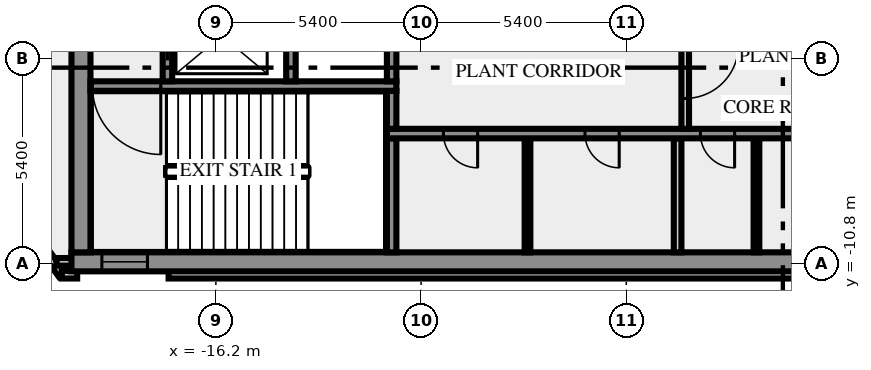
"""IFC4 building model, lengths in metres.
Left out: names, types, materials, properties, quantities, classifications, styles, units other than length and angle.
Written with IfcOpenShell. Run it as: python <this file> out.ifc"""

import sys

from ifc_helpers import new_model, si_unit, direction, frame, frame_2d, origin, place, context, subcontext, project, spatial, rectangle, extrude, element, fill, save


model = new_model("IFC4")
c1 = context("Model", 3, precision=1e-05, world=origin(), true_north=direction((0.0, 1.0)))
c2 = subcontext(c1, "Body", "Model", "MODEL_VIEW")
j1 = project(units=[si_unit("LENGTHUNIT", "METRE"), si_unit("PLANEANGLEUNIT", "RADIAN")], contexts=[c1])
p1 = place(None, origin())
s1 = spatial("IfcSite", under=j1, at=p1, CompositionType="ELEMENT")
p2 = place(p1, origin())
s2 = spatial("IfcBuilding", under=s1, at=p2, CompositionType="ELEMENT")
p3 = place(p2, frame((0.0, 0.0, 188.0)))
s3 = spatial("IfcBuildingStorey", under=s2, at=p3, CompositionType="ELEMENT", Elevation=188.0)
p4 = place(p3, frame((-21.833, -8.909, 0.0), z_axis=(0.0, 0.0, 1.0), x_axis=(0.587766567315, -0.809030569476, 0.0)))
e1 = element("IfcWall", 1, at=p4, inside=s3, PredefinedType="SOLIDWALL", context=c2, shape_type="SweptSolid", body=[
    extrude(rectangle(XDim=2.688, YDim=0.2, at=frame_2d((1.344, 0.0))), origin(), (0.0, 0.0, 1.0), 5.65),
])
p5 = place(p3, frame((-20.256, -11.088, 0.0), z_axis=(0.0, 0.0, 1.0), x_axis=(1.0, 0.0, 0.0)))
e2 = element("IfcWall", 2, at=p5, inside=s3, PredefinedType="SOLIDWALL", context=c2, shape_type="SweptSolid", body=[
    extrude(rectangle(XDim=0.406, YDim=0.2, at=frame_2d((0.203, 0.0))), origin(), (0.0, 0.0, 1.0), 5.65),
])
p6 = place(p3, frame((-17.444, -11.088, 0.0), z_axis=(0.0, 0.0, 1.0), x_axis=(1.0, 0.0, 0.0)))
e3 = element("IfcWall", 3, at=p6, inside=s3, PredefinedType="SOLIDWALL", context=c2, shape_type="SweptSolid", body=[
    extrude(rectangle(XDim=34.888, YDim=0.2, at=frame_2d((17.444, 0.0))), origin(), (0.0, 0.0, 1.0), 5.65),
])
p7 = place(p3, frame((-19.98, -10.75, 0.0), z_axis=(0.0, 0.0, 1.0), x_axis=(-1.0, 0.0, 0.0)))
e4 = element("IfcWall", 4, at=p7, inside=s3, PredefinedType="SOLIDWALL", context=c2, shape_type="SweptSolid", body=[
    extrude(rectangle(XDim=0.417, YDim=0.2, at=frame_2d((0.208, 0.0))), origin(), (0.0, 0.0, 1.0), 5.65),
])
p8 = place(p3, frame((-20.0, -10.75, 0.0), z_axis=(0.0, 0.0, 1.0), x_axis=(1.0, 0.0, 0.0)))
e5 = element("IfcWall", 5, at=p8, inside=s3, PredefinedType="SHEAR", context=c2, shape_type="SweptSolid", body=[
    extrude(rectangle(XDim=40.0, YDim=0.5, at=frame_2d((20.0, 0.0))), origin(), (0.0, 0.0, 1.0), 5.65),
])
p9 = place(p8, frame((0.8, 0.0, 1.0)))
e6 = element("IfcOpeningElement", 6, at=p9, cuts=e5, PredefinedType="OPENING", context=c2, shape_type="SweptSolid", body=[
    extrude(rectangle(XDim=1.2, YDim=1.2, at=frame_2d((0.6, 0.6))), frame((0.0, 0.26, 0.0), z_axis=(0.0, -1.0, 0.0), x_axis=(1.0, 0.0, 0.0)), (0.0, 0.0, 1.0), 0.52),
])
p10 = place(p8, frame((38.0, 0.0, 1.0)))
e7 = element("IfcOpeningElement", 7, at=p10, cuts=e5, PredefinedType="OPENING", context=c2, shape_type="SweptSolid", body=[
    extrude(rectangle(XDim=1.2, YDim=1.2, at=frame_2d((0.6, 0.6))), frame((0.0, 0.26, 0.0), z_axis=(0.0, -1.0, 0.0), x_axis=(1.0, 0.0, 0.0)), (0.0, 0.0, 1.0), 0.52),
])
p11 = place(p3, frame((-19.75, -10.5, 0.0), z_axis=(0.0, 0.0, 1.0), x_axis=(0.0, 1.0, 0.0)))
e8 = element("IfcWall", 8, at=p11, inside=s3, PredefinedType="SHEAR", context=c2, shape_type="SweptSolid", body=[
    extrude(rectangle(XDim=8.8, YDim=0.5, at=frame_2d((4.4, 0.0))), origin(), (0.0, 0.0, 1.0), 5.65),
])
p12 = place(p3, frame((-11.575, -10.5, 0.0), z_axis=(0.0, 0.0, 1.0), x_axis=(0.0, 1.0, 0.0)))
e9 = element("IfcWall", 9, at=p12, inside=s3, PredefinedType="SHEAR", context=c2, shape_type="SweptSolid", body=[
    extrude(rectangle(XDim=3.0, YDim=0.25, at=frame_2d((1.5, 0.0))), origin(), (0.0, 0.0, 1.0), 5.65),
])
p13 = place(p3, frame((-8.0, -10.5, 0.0), z_axis=(0.0, 0.0, 1.0), x_axis=(0.0, 1.0, 0.0)))
e10 = element("IfcWall", 10, at=p13, inside=s3, PredefinedType="PARTITIONING", context=c2, shape_type="SweptSolid", body=[
    extrude(rectangle(XDim=3.0, YDim=0.15, at=frame_2d((1.5, 0.0))), origin(), (0.0, 0.0, 1.0), 5.65),
])
p14 = place(p3, frame((-4.05, -10.5, 0.0), z_axis=(0.0, 0.0, 1.0), x_axis=(0.0, 1.0, 0.0)))
e11 = element("IfcWall", 11, at=p14, inside=s3, PredefinedType="SOLIDWALL", context=c2, shape_type="SweptSolid", body=[
    extrude(rectangle(XDim=3.0, YDim=0.2, at=frame_2d((1.5, 0.0))), origin(), (0.0, 0.0, 1.0), 5.65),
])
p15 = place(p3, frame((-1.975, -10.5, 0.0), z_axis=(0.0, 0.0, 1.0), x_axis=(0.0, 1.0, 0.0)))
e12 = element("IfcWall", 12, at=p15, inside=s3, PredefinedType="PARTITIONING", context=c2, shape_type="SweptSolid", body=[
    extrude(rectangle(XDim=3.0, YDim=0.15, at=frame_2d((1.5, 0.0))), origin(), (0.0, 0.0, 1.0), 5.65),
])
p16 = place(p3, frame((11.7, -7.375, 0.0), z_axis=(0.0, 0.0, 1.0), x_axis=(-1.0, 0.0, 0.0)))
e13 = element("IfcWall", 13, at=p16, inside=s3, PredefinedType="SHEAR", context=c2, shape_type="SweptSolid", body=[
    extrude(rectangle(XDim=23.4, YDim=0.25, at=frame_2d((11.7, 0.0))), origin(), (0.0, 0.0, 1.0), 5.65),
])
p17 = place(p16, frame((21.012, 0.0, 0.0)))
e14 = element("IfcOpeningElement", 14, at=p17, cuts=e13, PredefinedType="OPENING", context=c2, shape_type="SweptSolid", body=[
    extrude(rectangle(XDim=0.9, YDim=2.1, at=frame_2d((0.45, 1.05))), frame((0.0, 0.135, 0.0), z_axis=(0.0, -1.0, 0.0), x_axis=(1.0, 0.0, 0.0)), (0.0, 0.0, 1.0), 0.27),
])
p18 = place(p16, frame((17.287, 0.0, 0.0)))
e15 = element("IfcOpeningElement", 15, at=p18, cuts=e13, PredefinedType="OPENING", context=c2, shape_type="SweptSolid", body=[
    extrude(rectangle(XDim=0.9, YDim=2.1, at=frame_2d((0.45, 1.05))), frame((0.0, 0.135, 0.0), z_axis=(0.0, -1.0, 0.0), x_axis=(1.0, 0.0, 0.0)), (0.0, 0.0, 1.0), 0.27),
])
p19 = place(p16, frame((14.25, 0.0, 0.0)))
e16 = element("IfcOpeningElement", 16, at=p19, cuts=e13, PredefinedType="OPENING", context=c2, shape_type="SweptSolid", body=[
    extrude(rectangle(XDim=0.9, YDim=2.1, at=frame_2d((0.45, 1.05))), frame((0.0, 0.135, 0.0), z_axis=(0.0, -1.0, 0.0), x_axis=(1.0, 0.0, 0.0)), (0.0, 0.0, 1.0), 0.27),
])
p20 = place(p16, frame((11.475, 0.0, 0.0)))
e17 = element("IfcOpeningElement", 17, at=p20, cuts=e13, PredefinedType="OPENING", context=c2, shape_type="SweptSolid", body=[
    extrude(rectangle(XDim=0.9, YDim=2.1, at=frame_2d((0.45, 1.05))), frame((0.0, 0.135, 0.0), z_axis=(0.0, -1.0, 0.0), x_axis=(1.0, 0.0, 0.0)), (0.0, 0.0, 1.0), 0.27),
])
p21 = place(p3, frame((-11.575, -7.25, 0.0), z_axis=(0.0, 0.0, 1.0), x_axis=(0.0, 1.0, 0.0)))
e18 = element("IfcWall", 18, at=p21, inside=s3, PredefinedType="SHEAR", context=c2, shape_type="SweptSolid", body=[
    extrude(rectangle(XDim=1.0, YDim=0.25, at=frame_2d((0.5, 0.0))), origin(), (0.0, 0.0, 1.0), 5.65),
])
p22 = place(p3, frame((-3.85, -4.25, 0.0), z_axis=(0.0, 0.0, 1.0), x_axis=(0.0, -1.0, 0.0)))
e19 = element("IfcWall", 19, at=p22, inside=s3, PredefinedType="SOLIDWALL", context=c2, shape_type="SweptSolid", body=[
    extrude(rectangle(XDim=3.0, YDim=0.2, at=frame_2d((1.5, 0.0))), origin(), (0.0, 0.0, 1.0), 5.65),
])
p23 = place(p22, frame((0.8, 0.0, 0.0)))
e20 = element("IfcOpeningElement", 20, at=p23, cuts=e19, PredefinedType="OPENING", context=c2, shape_type="SweptSolid", body=[
    extrude(rectangle(XDim=1.4, YDim=2.1, at=frame_2d((0.7, 1.05))), frame((0.0, 0.11, 0.0), z_axis=(0.0, -1.0, 0.0), x_axis=(1.0, 0.0, 0.0)), (0.0, 0.0, 1.0), 0.22),
])
p24 = place(p3, frame((-11.45, -6.125, 0.0), z_axis=(0.0, 0.0, 1.0), x_axis=(-1.0, 0.0, 0.0)))
e21 = element("IfcWall", 21, at=p24, inside=s3, PredefinedType="SHEAR", context=c2, shape_type="SweptSolid", body=[
    extrude(rectangle(XDim=8.05, YDim=0.25, at=frame_2d((4.025, 0.0))), origin(), (0.0, 0.0, 1.0), 5.65),
])
p25 = place(p24, frame((6.2, 0.0, 0.0)))
e22 = element("IfcOpeningElement", 22, at=p25, cuts=e21, PredefinedType="OPENING", context=c2, shape_type="SweptSolid", body=[
    extrude(rectangle(XDim=1.8, YDim=2.1, at=frame_2d((0.9, 1.05))), frame((0.0, 0.135, 0.0), z_axis=(0.0, -1.0, 0.0), x_axis=(1.0, 0.0, 0.0)), (0.0, 0.0, 1.0), 0.27),
])
p26 = place(p3, frame((-17.475, -6.0, 0.0), z_axis=(0.0, 0.0, 1.0), x_axis=(0.0, 1.0, 0.0)))
e23 = element("IfcWall", 23, at=p26, inside=s3, PredefinedType="SHEAR", context=c2, shape_type="SweptSolid", body=[
    extrude(rectangle(XDim=4.3, YDim=0.25, at=frame_2d((2.15, 0.0))), origin(), (0.0, 0.0, 1.0), 5.65),
])
p27 = place(p26, frame((0.55, 0.0, 0.0)))
e24 = element("IfcOpeningElement", 24, at=p27, cuts=e23, PredefinedType="OPENING", context=c2, shape_type="SweptSolid", body=[
    extrude(rectangle(XDim=1.3, YDim=2.1, at=frame_2d((0.65, 1.05))), frame((0.0, 0.135, 0.0), z_axis=(0.0, -1.0, 0.0), x_axis=(1.0, 0.0, 0.0)), (0.0, 0.0, 1.0), 0.27),
])
p28 = place(p3, frame((-14.225, -6.0, 0.0), z_axis=(0.0, 0.0, 1.0), x_axis=(0.0, 1.0, 0.0)))
e25 = element("IfcWall", 25, at=p28, inside=s3, PredefinedType="SHEAR", context=c2, shape_type="SweptSolid", body=[
    extrude(rectangle(XDim=4.3, YDim=0.25, at=frame_2d((2.15, 0.0))), origin(), (0.0, 0.0, 1.0), 5.65),
])
p29 = place(p3, frame((-11.575, -6.0, 0.0), z_axis=(0.0, 0.0, 1.0), x_axis=(0.0, 1.0, 0.0)))
e26 = element("IfcWall", 26, at=p29, inside=s3, PredefinedType="SHEAR", context=c2, shape_type="SweptSolid", body=[
    extrude(rectangle(XDim=1.75, YDim=0.25, at=frame_2d((0.875, 0.0))), origin(), (0.0, 0.0, 1.0), 5.65),
])
p30 = place(p9, origin())
e27 = element("IfcWindow", 27, at=p30, inside=s3, PartitioningType="SINGLE_PANEL", PredefinedType="WINDOW", context=c2, shape_type="SweptSolid", body=[
    extrude(rectangle(XDim=1.2, YDim=1.2, at=frame_2d((0.6, 0.6))), frame((0.0, 0.03, 0.0), z_axis=(0.0, -1.0, 0.0), x_axis=(1.0, 0.0, 0.0)), (0.0, 0.0, 1.0), 0.06),
])
fill(e6, e27)
p31 = place(p17, origin())
e28 = element("IfcDoor", 28, at=p31, inside=s3, OperationType="SINGLE_SWING_RIGHT", PredefinedType="DOOR", context=c2, shape_type="SweptSolid", body=[
    extrude(rectangle(XDim=0.9, YDim=2.1, at=frame_2d((0.45, 1.05))), frame((0.0, 0.025, 0.0), z_axis=(0.0, -1.0, 0.0), x_axis=(1.0, 0.0, 0.0)), (0.0, 0.0, 1.0), 0.05),
])
fill(e14, e28)
p32 = place(p18, origin())
e29 = element("IfcDoor", 29, at=p32, inside=s3, OperationType="SINGLE_SWING_RIGHT", PredefinedType="DOOR", context=c2, shape_type="SweptSolid", body=[
    extrude(rectangle(XDim=0.9, YDim=2.1, at=frame_2d((0.45, 1.05))), frame((0.0, 0.025, 0.0), z_axis=(0.0, -1.0, 0.0), x_axis=(1.0, 0.0, 0.0)), (0.0, 0.0, 1.0), 0.05),
])
fill(e15, e29)
p33 = place(p19, origin())
e30 = element("IfcDoor", 30, at=p33, inside=s3, OperationType="SINGLE_SWING_RIGHT", PredefinedType="DOOR", context=c2, shape_type="SweptSolid", body=[
    extrude(rectangle(XDim=0.9, YDim=2.1, at=frame_2d((0.45, 1.05))), frame((0.0, 0.025, 0.0), z_axis=(0.0, -1.0, 0.0), x_axis=(1.0, 0.0, 0.0)), (0.0, 0.0, 1.0), 0.05),
])
fill(e16, e30)
p34 = place(p23, origin())
e31 = element("IfcDoor", 31, at=p34, inside=s3, OperationType="DOUBLE_DOOR_SINGLE_SWING", PredefinedType="DOOR", context=c2, shape_type="SweptSolid", body=[
    extrude(rectangle(XDim=1.4, YDim=2.1, at=frame_2d((0.7, 1.05))), frame((0.0, 0.025, 0.0), z_axis=(0.0, -1.0, 0.0), x_axis=(1.0, 0.0, 0.0)), (0.0, 0.0, 1.0), 0.05),
])
fill(e20, e31)
p35 = place(p25, origin())
e32 = element("IfcDoor", 32, at=p35, inside=s3, OperationType="DOUBLE_DOOR_SINGLE_SWING", PredefinedType="DOOR", context=c2, shape_type="SweptSolid", body=[
    extrude(rectangle(XDim=1.8, YDim=2.1, at=frame_2d((0.9, 1.05))), frame((0.0, 0.025, 0.0), z_axis=(0.0, -1.0, 0.0), x_axis=(1.0, 0.0, 0.0)), (0.0, 0.0, 1.0), 0.05),
])
fill(e22, e32)
p36 = place(p27, origin())
e33 = element("IfcDoor", 33, at=p36, inside=s3, OperationType="DOUBLE_DOOR_SLIDING", PredefinedType="DOOR", context=c2, shape_type="SweptSolid", body=[
    extrude(rectangle(XDim=1.3, YDim=2.1, at=frame_2d((0.65, 1.05))), frame((0.0, 0.025, 0.0), z_axis=(0.0, -1.0, 0.0), x_axis=(1.0, 0.0, 0.0)), (0.0, 0.0, 1.0), 0.05),
])
fill(e24, e33)
save(model, sys.argv[1])
